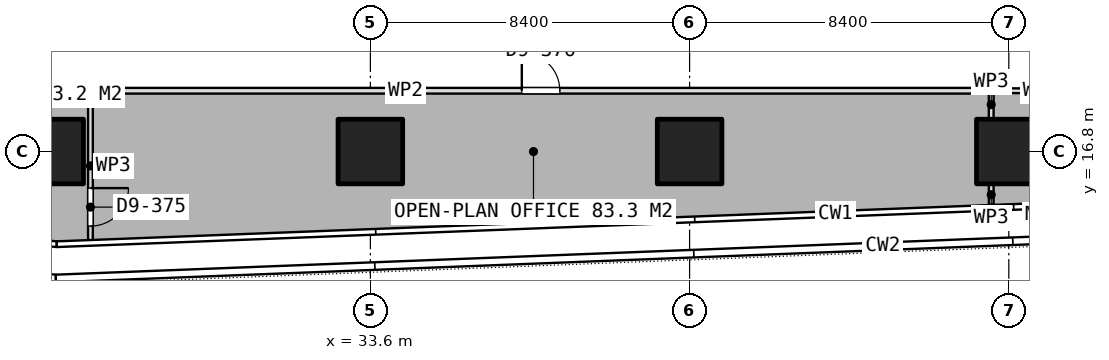
"""IFC4 building model, lengths in metres.
Left out: names, types, materials, properties, quantities, classifications, styles, units other than length and angle.
Written with IfcOpenShell. Run it as: python <this file> out.ifc"""

import sys

from ifc_helpers import new_model, si_unit, direction, frame, frame_2d, origin, origin_2d, place, context, subcontext, project, spatial, rectangle, extrude, element, fill, save


model = new_model("IFC4")
c1 = context("Model", 3, precision=1e-05, world=origin(), true_north=direction((0.0, 1.0)))
c2 = subcontext(c1, "Body", "Model", "MODEL_VIEW")
j1 = project(units=[si_unit("LENGTHUNIT", "METRE"), si_unit("PLANEANGLEUNIT", "RADIAN")], contexts=[c1])
p1 = place(None, origin())
s1 = spatial("IfcSite", under=j1, at=p1, CompositionType="ELEMENT")
p2 = place(p1, origin())
s2 = spatial("IfcBuilding", under=s1, at=p2, CompositionType="ELEMENT")
p3 = place(p2, frame((0.0, 0.0, 110.3)))
s3 = spatial("IfcBuildingStorey", under=s2, at=p3, CompositionType="ELEMENT", Elevation=110.3)
for number, where, z_axis, x_axis in (
    (1, (25.2, 16.8, 0.0), (0.0, 0.0, 1.0), (1.0, 0.0, 0.0)),
    (2, (33.6, 16.8, 0.0), (0.0, 0.0, 1.0), (1.0, 0.0, 0.0)),
    (3, (42.0, 16.8, 0.0), (0.0, 0.0, 1.0), (1.0, 0.0, 0.0)),
    (4, (50.4, 16.8, 0.0), (0.0, 0.0, 1.0), (1.0, 0.0, 0.0)),
):
    element("IfcColumn", number, at=place(p3, frame(where, z_axis=z_axis, x_axis=x_axis)), inside=s3, PredefinedType="COLUMN", context=c2, shape_type="SweptSolid", body=[
        extrude(rectangle(XDim=1.7, YDim=1.7, at=origin_2d()), origin(), (0.0, 0.0, 1.0), 3.75),
    ])
p4 = place(p3, frame((49.937, 18.4, 0.0), z_axis=(0.0, 0.0, 1.0), x_axis=(1.0, 0.0, 0.0)))
e5 = element("IfcWall", 5, at=p4, inside=s3, PredefinedType="PARTITIONING", context=c2, shape_type="SweptSolid", body=[
    extrude(rectangle(XDim=6.463, YDim=0.125, at=frame_2d((3.231, 0.0))), origin(), (0.0, 0.0, 1.0), 3.5),
])
p5 = place(p4, frame((2.731, 0.0, 0.0)))
e6 = element("IfcOpeningElement", 6, at=p5, cuts=e5, PredefinedType="OPENING", context=c2, shape_type="SweptSolid", body=[
    extrude(rectangle(XDim=1.0, YDim=2.1, at=frame_2d((0.5, 1.05))), frame((0.0, 0.073, 0.0), z_axis=(0.0, -1.0, 0.0), x_axis=(1.0, 0.0, 0.0)), (0.0, 0.0, 1.0), 0.145),
])
p6 = place(p3, frame((49.937, 15.399, 0.0), z_axis=(0.0, 0.0, 1.0), x_axis=(0.0, 1.0, 0.0)))
e7 = element("IfcWall", 7, at=p6, inside=s3, PredefinedType="PARTITIONING", context=c2, shape_type="SweptSolid", body=[
    extrude(rectangle(XDim=0.531, YDim=0.125, at=frame_2d((0.266, 0.0))), origin(), (0.0, 0.0, 1.0), 3.5),
])
p7 = place(p3, frame((49.937, 17.67, 0.0), z_axis=(0.0, 0.0, 1.0), x_axis=(0.0, 1.0, 0.0)))
e8 = element("IfcWall", 8, at=p7, inside=s3, PredefinedType="PARTITIONING", context=c2, shape_type="SweptSolid", body=[
    extrude(rectangle(XDim=0.73, YDim=0.125, at=frame_2d((0.365, 0.0))), origin(), (0.0, 0.0, 1.0), 3.5),
])
p8 = place(p3, frame((19.2, 18.4, 0.0), z_axis=(0.0, 0.0, 1.0), x_axis=(1.0, 0.0, 0.0)))
e9 = element("IfcWall", 9, at=p8, inside=s3, PredefinedType="PARTITIONING", context=c2, shape_type="SweptSolid", body=[
    extrude(rectangle(XDim=7.034, YDim=0.125, at=frame_2d((3.517, 0.0))), origin(), (0.0, 0.0, 1.0), 3.5),
])
p9 = place(p3, frame((26.234, 18.4, 0.0), z_axis=(0.0, 0.0, 1.0), x_axis=(0.0, -1.0, 0.0)))
e10 = element("IfcWall", 10, at=p9, inside=s3, PredefinedType="PARTITIONING", context=c2, shape_type="SweptSolid", body=[
    extrude(rectangle(XDim=3.954, YDim=0.125, at=frame_2d((1.977, 0.0))), origin(), (0.0, 0.0, 1.0), 3.5),
])
p10 = place(p9, frame((2.562, 0.0, 0.0)))
e11 = element("IfcOpeningElement", 11, at=p10, cuts=e10, PredefinedType="OPENING", context=c2, shape_type="SweptSolid", body=[
    extrude(rectangle(XDim=1.0, YDim=2.1, at=frame_2d((0.5, 1.05))), frame((0.0, 0.073, 0.0), z_axis=(0.0, -1.0, 0.0), x_axis=(1.0, 0.0, 0.0)), (0.0, 0.0, 1.0), 0.145),
])
p11 = place(p3, frame((26.234, 18.4, 0.0), z_axis=(0.0, 0.0, 1.0), x_axis=(1.0, 0.0, 0.0)))
e12 = element("IfcWall", 12, at=p11, inside=s3, PredefinedType="PARTITIONING", context=c2, shape_type="SweptSolid", body=[
    extrude(rectangle(XDim=23.702, YDim=0.15, at=frame_2d((11.851, 0.0))), origin(), (0.0, 0.0, 1.0), 3.5),
])
p12 = place(p11, frame((11.351, 0.0, 0.0)))
e13 = element("IfcOpeningElement", 13, at=p12, cuts=e12, PredefinedType="OPENING", context=c2, shape_type="SweptSolid", body=[
    extrude(rectangle(XDim=1.0, YDim=2.1, at=frame_2d((0.5, 1.05))), frame((0.0, 0.085, 0.0), z_axis=(0.0, -1.0, 0.0), x_axis=(1.0, 0.0, 0.0)), (0.0, 0.0, 1.0), 0.17),
])
p13 = place(p10, origin())
e14 = element("IfcDoor", 14, at=p13, inside=s3, OperationType="SINGLE_SWING_LEFT", PredefinedType="DOOR", context=c2, shape_type="SweptSolid", body=[
    extrude(rectangle(XDim=1.0, YDim=2.1, at=frame_2d((0.5, 1.05))), frame((0.0, 0.025, 0.0), z_axis=(0.0, -1.0, 0.0), x_axis=(1.0, 0.0, 0.0)), (0.0, 0.0, 1.0), 0.05),
])
fill(e11, e14)
p14 = place(p12, origin())
e15 = element("IfcDoor", 15, at=p14, inside=s3, OperationType="SINGLE_SWING_LEFT", PredefinedType="DOOR", context=c2, shape_type="SweptSolid", body=[
    extrude(rectangle(XDim=1.0, YDim=2.1, at=frame_2d((0.5, 1.05))), frame((0.0, 0.025, 0.0), z_axis=(0.0, -1.0, 0.0), x_axis=(1.0, 0.0, 0.0)), (0.0, 0.0, 1.0), 0.05),
])
fill(e13, e15)
save(model, sys.argv[1])
